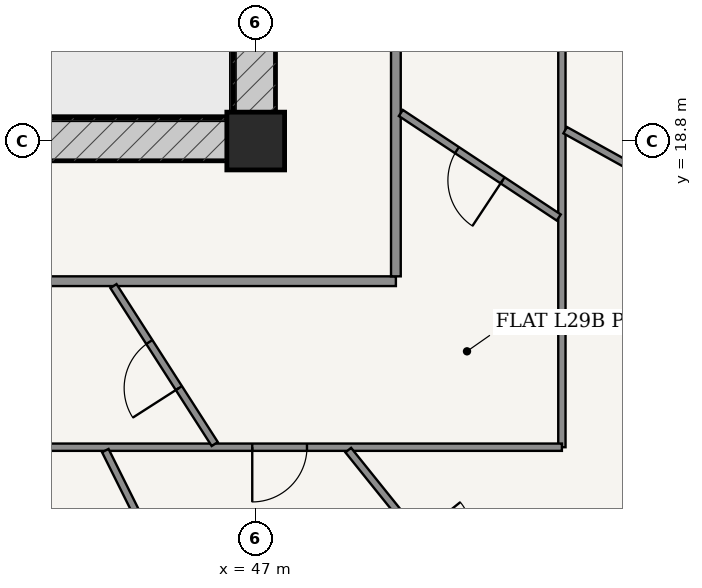
"""IFC4 building model, lengths in metres.
Left out: names, types, materials, properties, quantities, classifications, styles, units other than length and angle.
Written with IfcOpenShell. Run it as: python <this file> out.ifc"""

import sys

from ifc_helpers import new_model, si_unit, direction, frame, frame_2d, origin, origin_2d, place, context, subcontext, project, spatial, rectangle, extrude, source, transform, mapped, element, fill, save


model = new_model("IFC4")
c1 = context("Model", 3, precision=1e-05, world=origin(), true_north=direction((-0.2419218956, 0.970295726276)))
c2 = subcontext(c1, "Body", "Model", "MODEL_VIEW")
j1 = project(units=[si_unit("LENGTHUNIT", "METRE"), si_unit("PLANEANGLEUNIT", "RADIAN")], contexts=[c1])
p1 = place(None, origin())
s1 = spatial("IfcSite", under=j1, at=p1, CompositionType="ELEMENT")
p2 = place(p1, origin())
s2 = spatial("IfcBuilding", under=s1, at=p2, CompositionType="ELEMENT")
p3 = place(p2, frame((0.0, 0.0, 112.2)))
s3 = spatial("IfcBuildingStorey", under=s2, at=p3, CompositionType="ELEMENT", Elevation=112.2)
p4 = place(p3, frame((47.0, 18.8, 0.0), z_axis=(0.0, 0.0, 1.0), x_axis=(1.0, 0.0, 0.0)))
e1 = element("IfcColumn", 1, at=p4, inside=s3, PredefinedType="COLUMN", context=c2, shape_type="SweptSolid", body=[
    extrude(rectangle(XDim=0.95, YDim=0.95, at=origin_2d()), origin(), (0.0, 0.0, 1.0), 3.6),
])
p5 = place(p3, frame((28.675, 18.825, 0.0), z_axis=(0.0, 0.0, 1.0), x_axis=(1.0, 0.0, 0.0)))
e2 = element("IfcWall", 2, at=p5, inside=s3, PredefinedType="SHEAR", context=c2, shape_type="SweptSolid", body=[
    extrude(rectangle(XDim=18.65, YDim=0.7, at=frame_2d((9.325, 0.0))), origin(), (0.0, 0.0, 1.0), 3.325),
])
p6 = place(p5, frame((7.577, 0.0, 0.0)))
e3 = element("IfcOpeningElement", 3, at=p6, cuts=e2, PredefinedType="OPENING", context=c2, shape_type="SweptSolid", body=[
    extrude(rectangle(XDim=0.85, YDim=2.1, at=frame_2d((0.425, 1.05))), frame((0.0, 0.36, 0.0), z_axis=(0.0, -1.0, 0.0), x_axis=(1.0, 0.0, 0.0)), (0.0, 0.0, 1.0), 0.72),
])
p7 = place(p5, frame((10.623, 0.0, 0.0)))
e4 = element("IfcOpeningElement", 4, at=p7, cuts=e2, PredefinedType="OPENING", context=c2, shape_type="SweptSolid", body=[
    extrude(rectangle(XDim=0.85, YDim=2.1, at=frame_2d((0.425, 1.05))), frame((0.0, 0.36, 0.0), z_axis=(0.0, -1.0, 0.0), x_axis=(1.0, 0.0, 0.0)), (0.0, 0.0, 1.0), 0.72),
])
p8 = place(p3, frame((46.975, 19.175, 0.0), z_axis=(0.0, 0.0, 1.0), x_axis=(0.0, 1.0, 0.0)))
e5 = element("IfcWall", 5, at=p8, inside=s3, PredefinedType="SHEAR", context=c2, shape_type="SweptSolid", body=[
    extrude(rectangle(XDim=15.25, YDim=0.7, at=frame_2d((7.625, 0.0))), origin(), (0.0, 0.0, 1.0), 3.325),
])
p9 = place(p8, frame((9.875, 0.0, 0.0)))
e6 = element("IfcOpeningElement", 6, at=p9, cuts=e5, PredefinedType="OPENING", context=c2, shape_type="SweptSolid", body=[
    extrude(rectangle(XDim=1.5, YDim=2.2, at=frame_2d((0.75, 1.1))), frame((0.0, 0.36, 0.0), z_axis=(0.0, -1.0, 0.0), x_axis=(1.0, 0.0, 0.0)), (0.0, 0.0, 1.0), 0.72),
])
p10 = place(p3, frame((52.7, 8.398, 0.0), z_axis=(0.0, 0.0, 1.0), x_axis=(0.769254958887, 0.638941944333, 0.0)))
e7 = element("IfcWall", 7, at=p10, inside=s3, PredefinedType="SOLIDWALL", context=c2, shape_type="SweptSolid", body=[
    extrude(rectangle(XDim=9.69, YDim=0.28, at=frame_2d((4.845, 0.0))), origin(), (0.0, 0.0, 1.0), 3.325),
])
p11 = place(p10, frame((1.566, 0.0, 0.85)))
e8 = element("IfcOpeningElement", 8, at=p11, cuts=e7, PredefinedType="OPENING", context=c2, shape_type="SweptSolid", body=[
    extrude(rectangle(XDim=2.1, YDim=1.95, at=frame_2d((1.05, 0.975))), frame((0.0, 0.15, 0.0), z_axis=(0.0, -1.0, 0.0), x_axis=(1.0, 0.0, 0.0)), (0.0, 0.0, 1.0), 0.3),
])
p12 = place(p10, frame((6.023, 0.0, 0.85)))
e9 = element("IfcOpeningElement", 9, at=p12, cuts=e7, PredefinedType="OPENING", context=c2, shape_type="SweptSolid", body=[
    extrude(rectangle(XDim=2.1, YDim=1.95, at=frame_2d((1.05, 0.975))), frame((0.0, 0.15, 0.0), z_axis=(0.0, -1.0, 0.0), x_axis=(1.0, 0.0, 0.0)), (0.0, 0.0, 1.0), 0.3),
])
p13 = place(p3, frame((26.695, 16.495, 0.0), z_axis=(0.0, 0.0, 1.0), x_axis=(1.0, 0.0, 0.0)))
e10 = element("IfcWall", 10, at=p13, inside=s3, PredefinedType="PARTITIONING", context=c2, shape_type="SweptSolid", body=[
    extrude(rectangle(XDim=22.61, YDim=0.16, at=frame_2d((11.305, 0.0))), origin(), (0.0, 0.0, 1.0), 2.767),
])
p14 = place(p3, frame((49.305, 16.575, 0.0), z_axis=(0.0, 0.0, 1.0), x_axis=(0.0, 1.0, 0.0)))
e11 = element("IfcWall", 11, at=p14, inside=s3, PredefinedType="PARTITIONING", context=c2, shape_type="SweptSolid", body=[
    extrude(rectangle(XDim=20.45, YDim=0.16, at=frame_2d((10.225, 0.0))), origin(), (0.0, 0.0, 1.0), 2.767),
])
p15 = place(p14, frame((17.046, 0.0, 0.0)))
e12 = element("IfcOpeningElement", 12, at=p15, cuts=e11, PredefinedType="OPENING", context=c2, shape_type="SweptSolid", body=[
    extrude(rectangle(XDim=0.98, YDim=2.2, at=frame_2d((0.49, 1.1))), frame((0.0, 0.09, 0.0), z_axis=(0.0, -1.0, 0.0), x_axis=(1.0, 0.0, 0.0)), (0.0, 0.0, 1.0), 0.18),
])
p16 = place(p3, frame((52.035, 39.835, 0.0), z_axis=(0.0, 0.0, 1.0), x_axis=(0.0, -1.0, 0.0)))
e13 = element("IfcWall", 13, at=p16, inside=s3, PredefinedType="PARTITIONING", context=c2, shape_type="SweptSolid", body=[
    extrude(rectangle(XDim=26.07, YDim=0.12, at=frame_2d((13.035, 0.0))), origin(), (0.0, 0.0, 1.0), 2.767),
])
p17 = place(p16, frame((3.362, 0.0, 0.0)))
e14 = element("IfcOpeningElement", 14, at=p17, cuts=e13, PredefinedType="OPENING", context=c2, shape_type="SweptSolid", body=[
    extrude(rectangle(XDim=0.9, YDim=2.15, at=frame_2d((0.45, 1.075))), frame((0.0, 0.07, 0.0), z_axis=(0.0, -1.0, 0.0), x_axis=(1.0, 0.0, 0.0)), (0.0, 0.0, 1.0), 0.14),
])
p18 = place(p16, frame((13.924, 0.0, 0.0)))
e15 = element("IfcOpeningElement", 15, at=p18, cuts=e13, PredefinedType="OPENING", context=c2, shape_type="SweptSolid", body=[
    extrude(rectangle(XDim=0.9, YDim=2.15, at=frame_2d((0.45, 1.075))), frame((0.0, 0.07, 0.0), z_axis=(0.0, -1.0, 0.0), x_axis=(1.0, 0.0, 0.0)), (0.0, 0.0, 1.0), 0.14),
])
p19 = place(p3, frame((52.035, 13.765, 0.0), z_axis=(0.0, 0.0, 1.0), x_axis=(-1.0, 0.0, 0.0)))
e16 = element("IfcWall", 16, at=p19, inside=s3, PredefinedType="PARTITIONING", context=c2, shape_type="SweptSolid", body=[
    extrude(rectangle(XDim=24.416, YDim=0.12, at=frame_2d((12.208, 0.0))), origin(), (0.0, 0.0, 1.0), 2.767),
])
p20 = place(p19, frame((4.192, 0.0, 0.0)))
e17 = element("IfcOpeningElement", 17, at=p20, cuts=e16, PredefinedType="OPENING", context=c2, shape_type="SweptSolid", body=[
    extrude(rectangle(XDim=0.9, YDim=2.15, at=frame_2d((0.45, 1.075))), frame((0.0, 0.07, 0.0), z_axis=(0.0, -1.0, 0.0), x_axis=(1.0, 0.0, 0.0)), (0.0, 0.0, 1.0), 0.14),
])
p21 = place(p19, frame((19.728, 0.0, 0.0)))
e18 = element("IfcOpeningElement", 18, at=p21, cuts=e16, PredefinedType="OPENING", context=c2, shape_type="SweptSolid", body=[
    extrude(rectangle(XDim=0.86, YDim=2.15, at=frame_2d((0.43, 1.075))), frame((0.0, 0.07, 0.0), z_axis=(0.0, -1.0, 0.0), x_axis=(1.0, 0.0, 0.0)), (0.0, 0.0, 1.0), 0.14),
])
p22 = place(p3, frame((44.526, 13.709, 0.0), z_axis=(0.0, 0.0, 1.0), x_axis=(0.446179583353, -0.894943450392, 0.0)))
e19 = element("IfcWall", 19, at=p22, inside=s3, PredefinedType="PARTITIONING", context=c2, shape_type="SweptSolid", body=[
    extrude(rectangle(XDim=8.125, YDim=0.12, at=frame_2d((4.062, 0.0))), origin(), (0.0, 0.0, 1.0), 2.767),
])
p23 = place(p22, frame((3.612, 0.0, 0.0)))
e20 = element("IfcOpeningElement", 20, at=p23, cuts=e19, PredefinedType="OPENING", context=c2, shape_type="SweptSolid", body=[
    extrude(rectangle(XDim=0.9, YDim=2.15, at=frame_2d((0.45, 1.075))), frame((0.0, 0.07, 0.0), z_axis=(0.0, -1.0, 0.0), x_axis=(1.0, 0.0, 0.0)), (0.0, 0.0, 1.0), 0.14),
])
p24 = place(p3, frame((48.522, 13.717, 0.0), z_axis=(0.0, 0.0, 1.0), x_axis=(0.626707979732, -0.77925419995, 0.0)))
e21 = element("IfcWall", 21, at=p24, inside=s3, PredefinedType="PARTITIONING", context=c2, shape_type="SweptSolid", body=[
    extrude(rectangle(XDim=6.679, YDim=0.12, at=frame_2d((3.339, 0.0))), origin(), (0.0, 0.0, 1.0), 2.767),
])
p25 = place(p24, frame((1.821, 0.0, 0.0)))
e22 = element("IfcOpeningElement", 22, at=p25, cuts=e21, PredefinedType="OPENING", context=c2, shape_type="SweptSolid", body=[
    extrude(rectangle(XDim=0.9, YDim=2.15, at=frame_2d((0.45, 1.075))), frame((0.0, 0.07, 0.0), z_axis=(0.0, -1.0, 0.0), x_axis=(1.0, 0.0, 0.0)), (0.0, 0.0, 1.0), 0.14),
])
p26 = place(p3, frame((52.089, 18.979, 0.0), z_axis=(0.0, 0.0, 1.0), x_axis=(0.874313476423, -0.485361664066, 0.0)))
e23 = element("IfcWall", 23, at=p26, inside=s3, PredefinedType="PARTITIONING", context=c2, shape_type="SweptSolid", body=[
    extrude(rectangle(XDim=9.066, YDim=0.12, at=frame_2d((4.533, 0.0))), origin(), (0.0, 0.0, 1.0), 2.767),
])
p27 = place(p3, frame((52.094, 21.95, 0.0), z_axis=(0.0, 0.0, 1.0), x_axis=(0.945573120726, -0.32540970078, 0.0)))
e24 = element("IfcWall", 24, at=p27, inside=s3, PredefinedType="PARTITIONING", context=c2, shape_type="SweptSolid", body=[
    extrude(rectangle(XDim=11.022, YDim=0.12, at=frame_2d((5.511, 0.0))), origin(), (0.0, 0.0, 1.0), 2.767),
])
p28 = place(p27, frame((5.061, 0.0, 0.0)))
e25 = element("IfcOpeningElement", 25, at=p28, cuts=e24, PredefinedType="OPENING", context=c2, shape_type="SweptSolid", body=[
    extrude(rectangle(XDim=0.9, YDim=2.15, at=frame_2d((0.45, 1.075))), frame((0.0, 0.07, 0.0), z_axis=(0.0, -1.0, 0.0), x_axis=(1.0, 0.0, 0.0)), (0.0, 0.0, 1.0), 0.14),
])
p29 = place(p3, frame((44.66, 16.415, 0.0), z_axis=(0.0, 0.0, 1.0), x_axis=(0.539825682796, -0.841776830397, 0.0)))
e26 = element("IfcWall", 26, at=p29, inside=s3, PredefinedType="PARTITIONING", context=c2, shape_type="SweptSolid", body=[
    extrude(rectangle(XDim=3.086, YDim=0.12, at=frame_2d((1.543, 0.0))), origin(), (0.0, 0.0, 1.0), 3.325),
])
p30 = place(p29, frame((1.093, 0.0, 0.0)))
e27 = element("IfcOpeningElement", 27, at=p30, cuts=e26, PredefinedType="OPENING", context=c2, shape_type="SweptSolid", body=[
    extrude(rectangle(XDim=0.9, YDim=2.15, at=frame_2d((0.45, 1.075))), frame((0.0, 0.07, 0.0), z_axis=(0.0, -1.0, 0.0), x_axis=(1.0, 0.0, 0.0)), (0.0, 0.0, 1.0), 0.14),
])
p31 = place(p3, frame((49.387, 19.261, 0.0), z_axis=(0.0, 0.0, 1.0), x_axis=(0.833806969544, -0.552056099993, 0.0)))
e28 = element("IfcWall", 28, at=p31, inside=s3, PredefinedType="PARTITIONING", context=c2, shape_type="SweptSolid", body=[
    extrude(rectangle(XDim=3.114, YDim=0.12, at=frame_2d((1.557, 0.0))), origin(), (0.0, 0.0, 1.0), 3.325),
])
p32 = place(p31, frame((1.107, 0.0, 0.0)))
e29 = element("IfcOpeningElement", 29, at=p32, cuts=e28, PredefinedType="OPENING", context=c2, shape_type="SweptSolid", body=[
    extrude(rectangle(XDim=0.9, YDim=2.15, at=frame_2d((0.45, 1.075))), frame((0.0, 0.07, 0.0), z_axis=(0.0, -1.0, 0.0), x_axis=(1.0, 0.0, 0.0)), (0.0, 0.0, 1.0), 0.14),
])
m1 = source(origin(), c2, "Body", "SweptSolid", [
    extrude(rectangle(XDim=0.9, YDim=2.15, at=frame_2d((0.45, 1.075))), frame((0.0, 0.025, 0.0), z_axis=(0.0, -1.0, 0.0), x_axis=(1.0, 0.0, 0.0)), (0.0, 0.0, 1.0), 0.05),
])
p33 = place(p32, frame((0.9, 0.0, 0.0), z_axis=(0.0, 0.0, 1.0), x_axis=(-1.0, 0.0, 0.0)))
e30 = element("IfcDoor", 30, at=p33, inside=s3, OperationType="SINGLE_SWING_LEFT", PredefinedType="DOOR", context=c2, shape_type="MappedRepresentation", body=[
    mapped(m1, transform((0.0, 0.0, 0.0), scale=1.0)),
])
fill(e29, e30)
p34 = place(p20, origin())
e31 = element("IfcDoor", 31, at=p34, inside=s3, OperationType="SINGLE_SWING_RIGHT", PredefinedType="DOOR", context=c2, shape_type="MappedRepresentation", body=[
    mapped(m1, transform((0.0, 0.0, 0.0), scale=1.0)),
])
fill(e17, e31)
p35 = place(p30, frame((0.9, 0.0, 0.0), z_axis=(0.0, 0.0, 1.0), x_axis=(-1.0, 0.0, 0.0)))
e32 = element("IfcDoor", 32, at=p35, inside=s3, OperationType="SINGLE_SWING_LEFT", PredefinedType="DOOR", context=c2, shape_type="MappedRepresentation", body=[
    mapped(m1, transform((0.0, 0.0, 0.0), scale=1.0)),
])
fill(e27, e32)
save(model, sys.argv[1])
